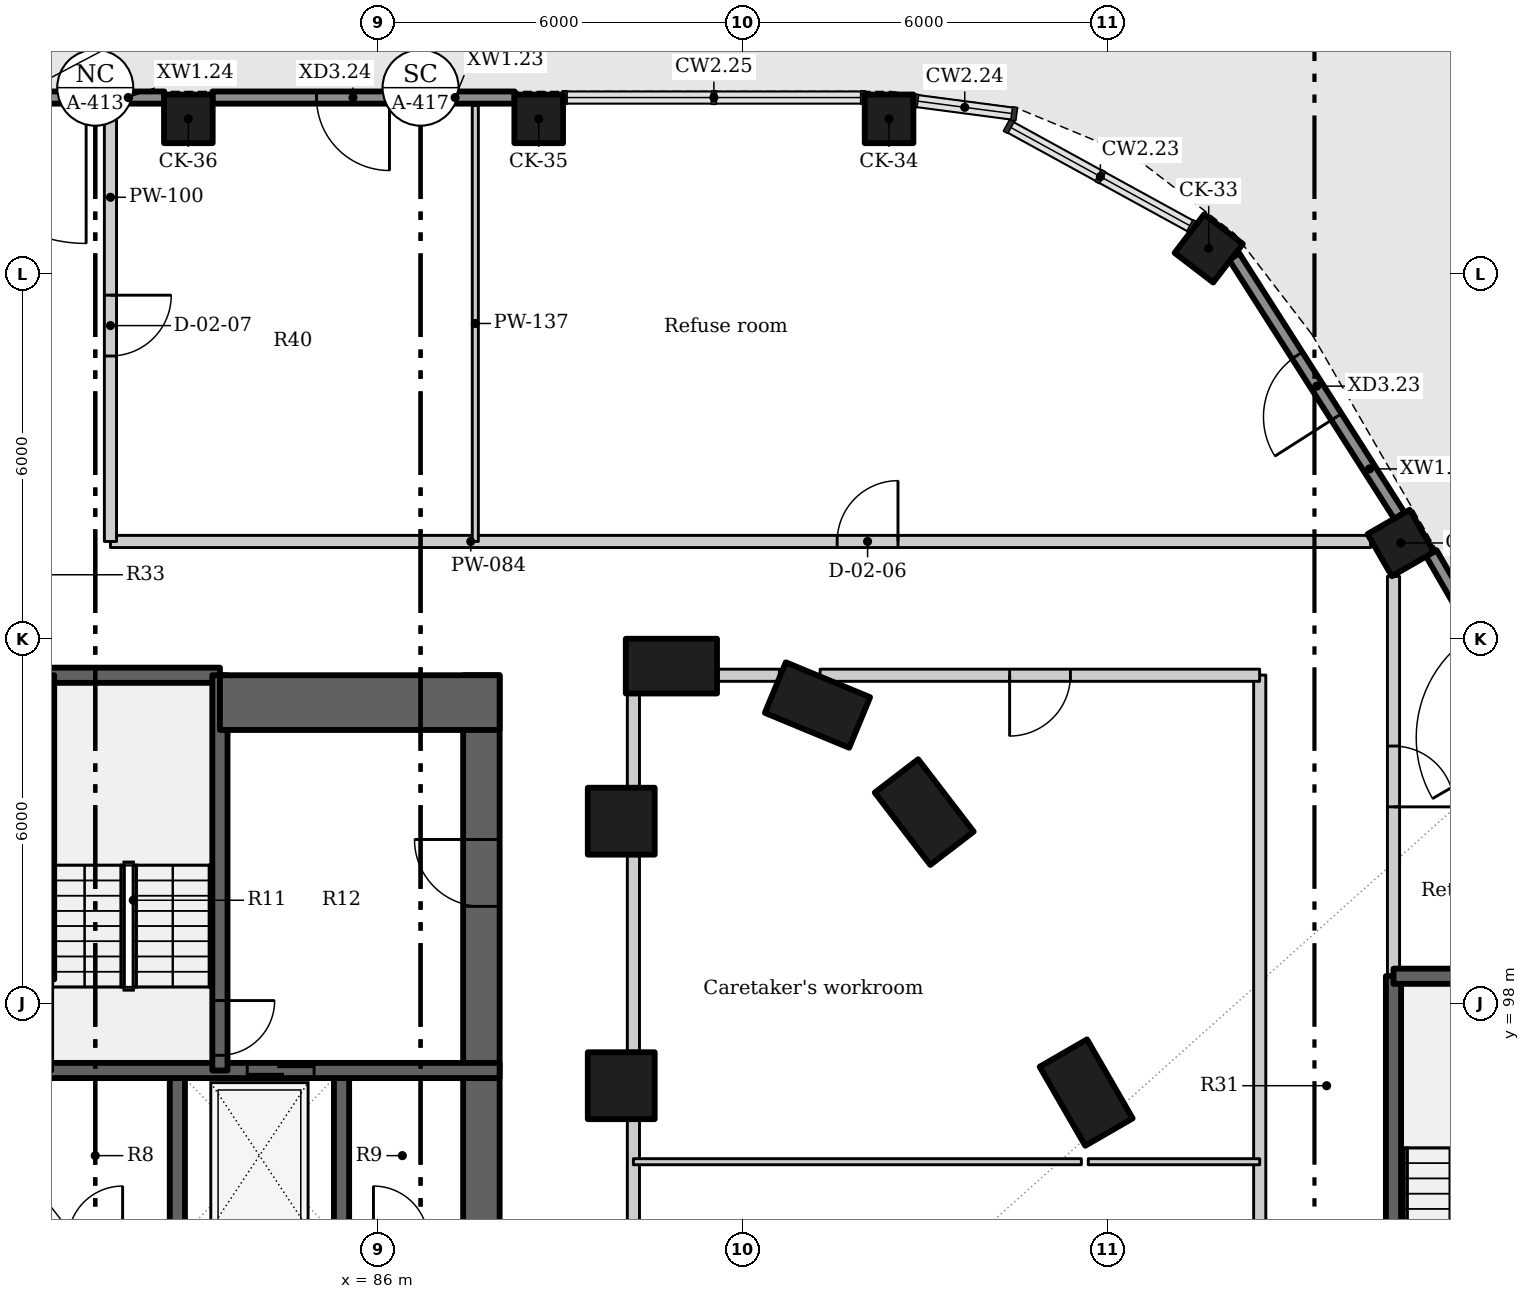
"""IFC4 building model, lengths in metres.
Left out: names, types, materials, properties, quantities, classifications, styles, units other than length and angle.
Written with IfcOpenShell. Run it as: python <this file> out.ifc"""

import sys

from ifc_helpers import new_model, si_unit, direction, frame, frame_2d, origin, origin_2d, place, context, subcontext, project, spatial, rectangle, extrude, element, fill, save


model = new_model("IFC4")
c1 = context("Model", 3, precision=1e-05, world=origin(), true_north=direction((0.0, 1.0)))
c2 = subcontext(c1, "Body", "Model", "MODEL_VIEW")
j1 = project(units=[si_unit("LENGTHUNIT", "METRE"), si_unit("PLANEANGLEUNIT", "RADIAN")], contexts=[c1])
p1 = place(None, origin())
s1 = spatial("IfcSite", under=j1, at=p1, CompositionType="ELEMENT")
p2 = place(p1, origin())
s2 = spatial("IfcBuilding", under=s1, at=p2, CompositionType="ELEMENT")
p3 = place(p2, origin())
s3 = spatial("IfcBuildingStorey", under=s2, at=p3, CompositionType="ELEMENT", Elevation=0.0)
for number, where, z_axis, x_axis in (
    (1, (97.646, 96.537, -1.8), (0.0, 0.0, 1.0), (-0.5, 0.866, 0.0)),
    (2, (94.982, 101.149, -1.8), (0.0, 0.0, 1.0), (-0.609, 0.793, 0.0)),
    (3, (93.227, 102.91, -1.8), (0.0, 0.0, 1.0), (-0.924, 0.383, 0.0)),
    (4, (90.825, 103.55, -1.8), (0.0, 0.0, 1.0), (-1.0, 0.0, 0.0)),
):
    element("IfcColumn", number, at=place(p3, frame(where, z_axis=z_axis, x_axis=x_axis)), inside=s3, PredefinedType="COLUMN", context=c2, shape_type="SweptSolid", body=[
        extrude(rectangle(XDim=1.5, YDim=0.9, at=origin_2d()), origin(), (0.0, 0.0, 1.0), 8.4),
    ])
for number, where, z_axis, x_axis in (
    (5, (90.0, 96.65, -1.8), (0.0, 0.0, 1.0), (0.0, 1.0, 0.0)),
    (6, (90.0, 101.0, -1.8), (0.0, 0.0, 1.0), (0.0, 1.0, 0.0)),
):
    element("IfcColumn", number, at=place(p3, frame(where, z_axis=z_axis, x_axis=x_axis)), inside=s3, PredefinedType="COLUMN", context=c2, shape_type="SweptSolid", body=[
        extrude(rectangle(XDim=1.1, YDim=1.1, at=origin_2d()), origin(), (0.0, 0.0, 1.0), 8.4),
    ])
for number, where, z_axis, x_axis in (
    (7, (102.82, 105.575, -1.8), (0.0, 0.0, 1.0), (-0.5, 0.866, 0.0)),
    (8, (99.661, 110.419, -1.8), (0.0, 0.0, 1.0), (-0.793, 0.609, 0.0)),
    (9, (94.404, 112.55, -1.8), (0.0, 0.0, 1.0), (-1.0, 0.0, 0.0)),
    (10, (88.643, 112.55, -1.8), (0.0, 0.0, 1.0), (-1.0, 0.0, 0.0)),
    (11, (82.881, 112.55, -1.8), (0.0, 0.0, 1.0), (-1.0, 0.0, 0.0)),
):
    element("IfcColumn", number, at=place(p3, frame(where, z_axis=z_axis, x_axis=x_axis)), inside=s3, PredefinedType="COLUMN", context=c2, shape_type="SweptSolid", body=[
        extrude(rectangle(XDim=0.8, YDim=0.8, at=origin_2d()), origin(), (0.0, 0.0, 1.0), 8.4),
    ])
p4 = place(p3, frame((105.826, 101.068, 0.0), z_axis=(0.0, 0.0, 1.0), x_axis=(-0.499990997566, 0.86603060128, 0.0)))
e12 = element("IfcWall", 12, at=p4, inside=s3, PredefinedType="SOLIDWALL", context=c2, shape_type="SweptSolid", body=[
    extrude(rectangle(XDim=5.01, YDim=0.2, at=frame_2d((2.505, 0.0))), origin(), (0.0, 0.0, 1.0), 5.4),
])
p5 = place(p4, frame((1.505, 0.0, 0.0)))
e13 = element("IfcOpeningElement", 13, at=p5, cuts=e12, PredefinedType="OPENING", context=c2, shape_type="SweptSolid", body=[
    extrude(rectangle(XDim=2.0, YDim=2.4, at=frame_2d((1.0, 1.2))), frame((0.0, 0.11, 0.0), z_axis=(0.0, -1.0, 0.0), x_axis=(1.0, 0.0, 0.0)), (0.0, 0.0, 1.0), 0.22),
])
p6 = place(p3, frame((102.798, 106.022, 0.0), z_axis=(0.0, 0.0, 1.0), x_axis=(-0.537671911107, 0.843154147239, 0.0)))
e14 = element("IfcWall", 14, at=p6, inside=s3, PredefinedType="SOLIDWALL", context=c2, shape_type="SweptSolid", body=[
    extrude(rectangle(XDim=5.057, YDim=0.2, at=frame_2d((2.528, 0.0))), origin(), (0.0, 0.0, 1.0), 5.4),
])
p7 = place(p6, frame((1.928, 0.0, 0.0)))
e15 = element("IfcOpeningElement", 15, at=p7, cuts=e14, PredefinedType="OPENING", context=c2, shape_type="SweptSolid", body=[
    extrude(rectangle(XDim=1.2, YDim=2.4, at=frame_2d((0.6, 1.2))), frame((0.0, 0.11, 0.0), z_axis=(0.0, -1.0, 0.0), x_axis=(1.0, 0.0, 0.0)), (0.0, 0.0, 1.0), 0.22),
])
p8 = place(p3, frame((88.247, 112.9, 0.0), z_axis=(0.0, 0.0, 1.0), x_axis=(-1.0, 0.0, 0.0)))
e16 = element("IfcWall", 16, at=p8, inside=s3, PredefinedType="SOLIDWALL", context=c2, shape_type="SweptSolid", body=[
    extrude(rectangle(XDim=4.97, YDim=0.2, at=frame_2d((2.485, 0.0))), origin(), (0.0, 0.0, 1.0), 5.4),
])
p9 = place(p8, frame((2.058, 0.0, 0.0)))
e17 = element("IfcOpeningElement", 17, at=p9, cuts=e16, PredefinedType="OPENING", context=c2, shape_type="SweptSolid", body=[
    extrude(rectangle(XDim=1.2, YDim=2.4, at=frame_2d((0.6, 1.2))), frame((0.0, 0.11, 0.0), z_axis=(0.0, -1.0, 0.0), x_axis=(1.0, 0.0, 0.0)), (0.0, 0.0, 1.0), 0.22),
])
p10 = place(p3, frame((82.485, 112.9, 0.0), z_axis=(0.0, 0.0, 1.0), x_axis=(-1.0, 0.0, 0.0)))
e18 = element("IfcWall", 18, at=p10, inside=s3, PredefinedType="SOLIDWALL", context=c2, shape_type="SweptSolid", body=[
    extrude(rectangle(XDim=4.97, YDim=0.2, at=frame_2d((2.485, 0.0))), origin(), (0.0, 0.0, 1.0), 5.4),
])
p11 = place(p10, frame((1.285, 0.0, 0.0)))
e19 = element("IfcOpeningElement", 19, at=p11, cuts=e18, PredefinedType="OPENING", context=c2, shape_type="SweptSolid", body=[
    extrude(rectangle(XDim=2.4, YDim=2.7, at=frame_2d((1.2, 1.35))), frame((0.0, 0.11, 0.0), z_axis=(0.0, -1.0, 0.0), x_axis=(1.0, 0.0, 0.0)), (0.0, 0.0, 1.0), 0.22),
])
for number, where, z_axis, x_axis in (
    (20, (82.7, 94.1, -1.8), (0.0, 0.0, 1.0), (0.0, 1.0, 0.0)),
    (21, (85.4, 94.1, -1.8), (0.0, 0.0, 1.0), (0.0, 1.0, 0.0)),
):
    element("IfcWall", number, at=place(p3, frame(where, z_axis=z_axis, x_axis=x_axis)), inside=s3, PredefinedType="SHEAR", context=c2, shape_type="SweptSolid", body=[
        extrude(rectangle(XDim=2.8, YDim=0.25, at=frame_2d((1.4, 0.0))), origin(), (0.0, 0.0, 1.0), 8.1),
    ])
p12 = place(p3, frame((87.7, 87.8, -1.8), z_axis=(0.0, 0.0, 1.0), x_axis=(0.0, 1.0, 0.0)))
e22 = element("IfcWall", 22, at=p12, inside=s3, PredefinedType="SHEAR", context=c2, shape_type="SweptSolid", body=[
    extrude(rectangle(XDim=15.6, YDim=0.6, at=frame_2d((7.8, 0.0))), origin(), (0.0, 0.0, 1.0), 8.1),
])
p13 = place(p12, frame((3.85, 0.0, 1.8)))
e23 = element("IfcOpeningElement", 23, at=p13, cuts=e22, PredefinedType="OPENING", context=c2, shape_type="SweptSolid", body=[
    extrude(rectangle(XDim=1.5, YDim=2.1, at=frame_2d((0.75, 1.05))), frame((0.0, 0.31, 0.0), z_axis=(0.0, -1.0, 0.0), x_axis=(1.0, 0.0, 0.0)), (0.0, 0.0, 1.0), 0.62),
])
p14 = place(p12, frame((11.799, 0.0, 1.8)))
e24 = element("IfcOpeningElement", 24, at=p14, cuts=e22, PredefinedType="OPENING", context=c2, shape_type="SweptSolid", body=[
    extrude(rectangle(XDim=1.1, YDim=2.1, at=frame_2d((0.55, 1.05))), frame((0.0, 0.31, 0.0), z_axis=(0.0, -1.0, 0.0), x_axis=(1.0, 0.0, 0.0)), (0.0, 0.0, 1.0), 0.62),
])
p15 = place(p3, frame((80.0, 96.9, -1.8), z_axis=(0.0, 0.0, 1.0), x_axis=(1.0, 0.0, 0.0)))
e25 = element("IfcWall", 25, at=p15, inside=s3, PredefinedType="SHEAR", context=c2, shape_type="SweptSolid", body=[
    extrude(rectangle(XDim=8.0, YDim=0.25, at=frame_2d((4.0, 0.0))), origin(), (0.0, 0.0, 1.0), 8.1),
])
p16 = place(p15, frame((3.849, 0.0, 1.8)))
e26 = element("IfcOpeningElement", 26, at=p16, cuts=e25, PredefinedType="OPENING", context=c2, shape_type="SweptSolid", body=[
    extrude(rectangle(XDim=1.1, YDim=2.1, at=frame_2d((0.55, 1.05))), frame((0.0, 0.135, 0.0), z_axis=(0.0, -1.0, 0.0), x_axis=(1.0, 0.0, 0.0)), (0.0, 0.0, 1.0), 0.27),
])
p17 = place(p3, frame((80.55, 103.4, -1.8), z_axis=(0.0, 0.0, 1.0), x_axis=(1.0, 0.0, 0.0)))
e27 = element("IfcWall", 27, at=p17, inside=s3, PredefinedType="SHEAR", context=c2, shape_type="SweptSolid", body=[
    extrude(rectangle(XDim=2.85, YDim=0.25, at=frame_2d((1.425, 0.0))), origin(), (0.0, 0.0, 1.0), 8.1),
])
p18 = place(p3, frame((83.4, 103.4, -1.8), z_axis=(0.0, 0.0, 1.0), x_axis=(0.0, -1.0, 0.0)))
e28 = element("IfcWall", 28, at=p18, inside=s3, PredefinedType="SHEAR", context=c2, shape_type="SweptSolid", body=[
    extrude(rectangle(XDim=6.5, YDim=0.25, at=frame_2d((3.25, 0.0))), origin(), (0.0, 0.0, 1.0), 8.1),
])
p19 = place(p18, frame((5.35, 0.0, 1.8)))
e29 = element("IfcOpeningElement", 29, at=p19, cuts=e28, PredefinedType="OPENING", context=c2, shape_type="SweptSolid", body=[
    extrude(rectangle(XDim=0.9, YDim=2.1, at=frame_2d((0.45, 1.05))), frame((0.0, 0.135, 0.0), z_axis=(0.0, -1.0, 0.0), x_axis=(1.0, 0.0, 0.0)), (0.0, 0.0, 1.0), 0.27),
])
p20 = place(p3, frame((80.55, 98.397, -1.8), z_axis=(0.0, 0.0, 1.0), x_axis=(0.0, 1.0, 0.0)))
e30 = element("IfcWall", 30, at=p20, inside=s3, PredefinedType="SHEAR", context=c2, shape_type="SweptSolid", body=[
    extrude(rectangle(XDim=5.003, YDim=0.25, at=frame_2d((2.501, 0.0))), origin(), (0.0, 0.0, 1.0), 8.1),
])
p21 = place(p3, frame((83.4, 102.95, -1.8), z_axis=(0.0, 0.0, 1.0), x_axis=(1.0, 0.0, 0.0)))
e31 = element("IfcWall", 31, at=p21, inside=s3, PredefinedType="SHEAR", context=c2, shape_type="SweptSolid", body=[
    extrude(rectangle(XDim=4.6, YDim=0.9, at=frame_2d((2.3, 0.0))), origin(), (0.0, 0.0, 1.0), 8.1),
])
p22 = place(p3, frame((102.7, 91.997, -1.8), z_axis=(0.0, 0.0, 1.0), x_axis=(0.0, 1.0, 0.0)))
e32 = element("IfcWall", 32, at=p22, inside=s3, PredefinedType="SHEAR", context=c2, shape_type="SweptSolid", body=[
    extrude(rectangle(XDim=6.456, YDim=0.25, at=frame_2d((3.228, 0.0))), origin(), (0.0, 0.0, 1.0), 8.1),
])
p23 = place(p22, frame((0.25, 0.0, 1.8)))
e33 = element("IfcOpeningElement", 33, at=p23, cuts=e32, PredefinedType="OPENING", context=c2, shape_type="SweptSolid", body=[
    extrude(rectangle(XDim=0.9, YDim=2.1, at=frame_2d((0.45, 1.05))), frame((0.0, 0.135, 0.0), z_axis=(0.0, -1.0, 0.0), x_axis=(1.0, 0.0, 0.0)), (0.0, 0.0, 1.0), 0.27),
])
p24 = place(p3, frame((102.7, 105.025, 0.0), z_axis=(0.0, 0.0, 1.0), x_axis=(0.0, -1.0, 0.0)))
e34 = element("IfcWall", 34, at=p24, inside=s3, PredefinedType="PARTITIONING", context=c2, shape_type="SweptSolid", body=[
    extrude(rectangle(XDim=6.578, YDim=0.2, at=frame_2d((3.289, 0.0))), origin(), (0.0, 0.0, 1.0), 6.3),
])
p25 = place(p24, frame((2.789, 0.0, 0.0)))
e35 = element("IfcOpeningElement", 35, at=p25, cuts=e34, PredefinedType="OPENING", context=c2, shape_type="SweptSolid", body=[
    extrude(rectangle(XDim=1.0, YDim=2.1, at=frame_2d((0.5, 1.05))), frame((0.0, 0.11, 0.0), z_axis=(0.0, -1.0, 0.0), x_axis=(1.0, 0.0, 0.0)), (0.0, 0.0, 1.0), 0.22),
])
p26 = place(p3, frame((81.6, 105.6, 0.0), z_axis=(0.0, 0.0, 1.0), x_axis=(1.0, 0.0, 0.0)))
e36 = element("IfcWall", 36, at=p26, inside=s3, PredefinedType="PARTITIONING", context=c2, shape_type="SweptSolid", body=[
    extrude(rectangle(XDim=20.723, YDim=0.2, at=frame_2d((10.362, 0.0))), origin(), (0.0, 0.0, 1.0), 6.3),
])
p27 = place(p26, frame((11.951, 0.0, 0.0)))
e37 = element("IfcOpeningElement", 37, at=p27, cuts=e36, PredefinedType="OPENING", context=c2, shape_type="SweptSolid", body=[
    extrude(rectangle(XDim=1.0, YDim=2.1, at=frame_2d((0.5, 1.05))), frame((0.0, 0.11, 0.0), z_axis=(0.0, -1.0, 0.0), x_axis=(1.0, 0.0, 0.0)), (0.0, 0.0, 1.0), 0.22),
])
p28 = place(p3, frame((100.5, 92.53, 0.0), z_axis=(0.0, 0.0, 1.0), x_axis=(0.0, 1.0, 0.0)))
e38 = element("IfcWall", 38, at=p28, inside=s3, PredefinedType="PARTITIONING", context=c2, shape_type="SweptSolid", body=[
    extrude(rectangle(XDim=10.873, YDim=0.2, at=frame_2d((5.437, 0.0))), origin(), (0.0, 0.0, 1.0), 6.3),
])
p29 = place(p3, frame((81.6, 112.77, 0.0), z_axis=(0.0, 0.0, 1.0), x_axis=(0.0, -1.0, 0.0)))
e39 = element("IfcWall", 39, at=p29, inside=s3, PredefinedType="PARTITIONING", context=c2, shape_type="SweptSolid", body=[
    extrude(rectangle(XDim=7.17, YDim=0.2, at=frame_2d((3.585, 0.0))), origin(), (0.0, 0.0, 1.0), 5.53),
])
p30 = place(p29, frame((3.12, 0.0, 0.0)))
e40 = element("IfcOpeningElement", 40, at=p30, cuts=e39, PredefinedType="OPENING", context=c2, shape_type="SweptSolid", body=[
    extrude(rectangle(XDim=1.0, YDim=2.1, at=frame_2d((0.5, 1.05))), frame((0.0, 0.11, 0.0), z_axis=(0.0, -1.0, 0.0), x_axis=(1.0, 0.0, 0.0)), (0.0, 0.0, 1.0), 0.22),
])
for number, where, z_axis, x_axis in (
    (41, (90.2, 92.867, 0.0), (0.0, 0.0, 1.0), (0.0, 1.0, 0.0)),
    (42, (90.2, 97.217, 0.0), (0.0, 0.0, 1.0), (0.0, 1.0, 0.0)),
):
    element("IfcWall", number, at=place(p3, frame(where, z_axis=z_axis, x_axis=x_axis)), inside=s3, PredefinedType="PARTITIONING", context=c2, shape_type="SweptSolid", body=[
        extrude(rectangle(XDim=3.216, YDim=0.2, at=frame_2d((1.608, 0.0))), origin(), (0.0, 0.0, 1.0), 5.53),
    ])
p31 = place(p3, frame((90.2, 101.567, 0.0), z_axis=(0.0, 0.0, 1.0), x_axis=(0.0, 1.0, 0.0)))
e43 = element("IfcWall", 43, at=p31, inside=s3, PredefinedType="PARTITIONING", context=c2, shape_type="SweptSolid", body=[
    extrude(rectangle(XDim=1.516, YDim=0.2, at=frame_2d((0.758, 0.0))), origin(), (0.0, 0.0, 1.0), 6.3),
])
p32 = place(p3, frame((91.592, 103.4, 0.0), z_axis=(0.0, 0.0, 1.0), x_axis=(1.0, 0.0, 0.0)))
e44 = element("IfcWall", 44, at=p32, inside=s3, PredefinedType="PARTITIONING", context=c2, shape_type="SweptSolid", body=[
    extrude(rectangle(XDim=1.008, YDim=0.2, at=frame_2d((0.504, 0.0))), origin(), (0.0, 0.0, 1.0), 5.38),
])
p33 = place(p3, frame((100.498, 103.4, 0.0), z_axis=(0.0, 0.0, 1.0), x_axis=(-1.0, 0.0, 0.0)))
e45 = element("IfcWall", 45, at=p33, inside=s3, PredefinedType="PARTITIONING", context=c2, shape_type="SweptSolid", body=[
    extrude(rectangle(XDim=7.228, YDim=0.2, at=frame_2d((3.614, 0.0))), origin(), (0.0, 0.0, 1.0), 6.3),
])
p34 = place(p33, frame((3.111, 0.0, 0.0)))
e46 = element("IfcOpeningElement", 46, at=p34, cuts=e45, PredefinedType="OPENING", context=c2, shape_type="SweptSolid", body=[
    extrude(rectangle(XDim=1.0, YDim=2.1, at=frame_2d((0.5, 1.05))), frame((0.0, 0.11, 0.0), z_axis=(0.0, -1.0, 0.0), x_axis=(1.0, 0.0, 0.0)), (0.0, 0.0, 1.0), 0.22),
])
p35 = place(p3, frame((102.7, 98.45, -1.8), z_axis=(0.0, 0.0, 1.0), x_axis=(1.0, 0.0, 0.0)))
e47 = element("IfcWall", 47, at=p35, inside=s3, PredefinedType="SHEAR", context=c2, shape_type="SweptSolid", body=[
    extrude(rectangle(XDim=3.45, YDim=0.25, at=frame_2d((1.725, 0.0))), origin(), (0.0, 0.0, 1.0), 8.1),
])
p36 = place(p3, frame((87.6, 105.6, 0.0), z_axis=(0.0, 0.0, 1.0), x_axis=(0.0, 1.0, 0.0)))
e48 = element("IfcWall", 48, at=p36, inside=s3, PredefinedType="PARTITIONING", context=c2, shape_type="SweptSolid", body=[
    extrude(rectangle(XDim=7.17, YDim=0.1, at=frame_2d((3.585, 0.0))), origin(), (0.0, 0.0, 1.0), 5.53),
])
p37 = place(p3, frame((90.2, 95.4, 0.0), z_axis=(0.0, 0.0, 1.0), x_axis=(1.0, 0.0, 0.0)))
e49 = element("IfcWall", 49, at=p37, inside=s3, PredefinedType="PARTITIONING", context=c2, shape_type="SweptSolid", body=[
    extrude(rectangle(XDim=7.366, YDim=0.1, at=frame_2d((3.683, 0.0))), origin(), (0.0, 0.0, 1.0), 6.3),
])
p38 = place(p3, frame((97.68, 95.4, 0.0), z_axis=(0.0, 0.0, 1.0), x_axis=(1.0, 0.0, 0.0)))
e50 = element("IfcWall", 50, at=p38, inside=s3, PredefinedType="PARTITIONING", context=c2, shape_type="SweptSolid", body=[
    extrude(rectangle(XDim=2.82, YDim=0.1, at=frame_2d((1.41, 0.0))), origin(), (0.0, 0.0, 1.0), 5.38),
])
p39 = place(p7, frame((1.2, 0.0, 0.0), z_axis=(0.0, 0.0, 1.0), x_axis=(-1.0, 0.0, 0.0)))
e51 = element("IfcDoor", 51, at=p39, inside=s3, OperationType="SINGLE_SWING_LEFT", PredefinedType="DOOR", context=c2, shape_type="SweptSolid", body=[
    extrude(rectangle(XDim=1.2, YDim=2.4, at=frame_2d((0.6, 1.2))), frame((0.0, 0.025, 0.0), z_axis=(0.0, -1.0, 0.0), x_axis=(1.0, 0.0, 0.0)), (0.0, 0.0, 1.0), 0.05),
])
fill(e15, e51)
p40 = place(p9, frame((1.2, 0.0, 0.0), z_axis=(0.0, 0.0, 1.0), x_axis=(-1.0, 0.0, 0.0)))
e52 = element("IfcDoor", 52, at=p40, inside=s3, OperationType="SINGLE_SWING_LEFT", PredefinedType="DOOR", context=c2, shape_type="SweptSolid", body=[
    extrude(rectangle(XDim=1.2, YDim=2.4, at=frame_2d((0.6, 1.2))), frame((0.0, 0.025, 0.0), z_axis=(0.0, -1.0, 0.0), x_axis=(1.0, 0.0, 0.0)), (0.0, 0.0, 1.0), 0.05),
])
fill(e17, e52)
p41 = place(p11, frame((2.4, 0.0, 0.0), z_axis=(0.0, 0.0, 1.0), x_axis=(-1.0, 0.0, 0.0)))
e53 = element("IfcDoor", 53, at=p41, inside=s3, OperationType="DOUBLE_DOOR_DOUBLE_SWING", PredefinedType="DOOR", context=c2, shape_type="SweptSolid", body=[
    extrude(rectangle(XDim=2.4, YDim=2.7, at=frame_2d((1.2, 1.35))), frame((0.0, 0.025, 0.0), z_axis=(0.0, -1.0, 0.0), x_axis=(1.0, 0.0, 0.0)), (0.0, 0.0, 1.0), 0.05),
])
fill(e19, e53)
p42 = place(p16, origin())
e54 = element("IfcDoor", 54, at=p42, inside=s3, OperationType="SLIDING_TO_LEFT", PredefinedType="DOOR", context=c2, shape_type="SweptSolid", body=[
    extrude(rectangle(XDim=1.1, YDim=2.1, at=frame_2d((0.55, 1.05))), frame((0.0, 0.025, 0.0), z_axis=(0.0, -1.0, 0.0), x_axis=(1.0, 0.0, 0.0)), (0.0, 0.0, 1.0), 0.05),
])
fill(e26, e54)
p43 = place(p19, origin())
e55 = element("IfcDoor", 55, at=p43, inside=s3, OperationType="SINGLE_SWING_LEFT", PredefinedType="DOOR", context=c2, shape_type="SweptSolid", body=[
    extrude(rectangle(XDim=0.9, YDim=2.1, at=frame_2d((0.45, 1.05))), frame((0.0, 0.025, 0.0), z_axis=(0.0, -1.0, 0.0), x_axis=(1.0, 0.0, 0.0)), (0.0, 0.0, 1.0), 0.05),
])
fill(e29, e55)
p44 = place(p25, origin())
e56 = element("IfcDoor", 56, at=p44, inside=s3, OperationType="SINGLE_SWING_RIGHT", PredefinedType="DOOR", context=c2, shape_type="SweptSolid", body=[
    extrude(rectangle(XDim=1.0, YDim=2.1, at=frame_2d((0.5, 1.05))), frame((0.0, 0.025, 0.0), z_axis=(0.0, -1.0, 0.0), x_axis=(1.0, 0.0, 0.0)), (0.0, 0.0, 1.0), 0.05),
])
fill(e35, e56)
p45 = place(p27, origin())
e57 = element("IfcDoor", 57, at=p45, inside=s3, OperationType="SINGLE_SWING_RIGHT", PredefinedType="DOOR", context=c2, shape_type="SweptSolid", body=[
    extrude(rectangle(XDim=1.0, YDim=2.1, at=frame_2d((0.5, 1.05))), frame((0.0, 0.025, 0.0), z_axis=(0.0, -1.0, 0.0), x_axis=(1.0, 0.0, 0.0)), (0.0, 0.0, 1.0), 0.05),
])
fill(e37, e57)
p46 = place(p30, origin())
e58 = element("IfcDoor", 58, at=p46, inside=s3, OperationType="SINGLE_SWING_LEFT", PredefinedType="DOOR", context=c2, shape_type="SweptSolid", body=[
    extrude(rectangle(XDim=1.0, YDim=2.1, at=frame_2d((0.5, 1.05))), frame((0.0, 0.025, 0.0), z_axis=(0.0, -1.0, 0.0), x_axis=(1.0, 0.0, 0.0)), (0.0, 0.0, 1.0), 0.05),
])
fill(e40, e58)
p47 = place(p34, origin())
e59 = element("IfcDoor", 59, at=p47, inside=s3, OperationType="SINGLE_SWING_RIGHT", PredefinedType="DOOR", context=c2, shape_type="SweptSolid", body=[
    extrude(rectangle(XDim=1.0, YDim=2.1, at=frame_2d((0.5, 1.05))), frame((0.0, 0.025, 0.0), z_axis=(0.0, -1.0, 0.0), x_axis=(1.0, 0.0, 0.0)), (0.0, 0.0, 1.0), 0.05),
])
fill(e46, e59)
p48 = place(p14, origin())
e60 = element("IfcDoor", 60, at=p48, inside=s3, OperationType="SINGLE_SWING_RIGHT", PredefinedType="DOOR", context=c2, shape_type="SweptSolid", body=[
    extrude(rectangle(XDim=1.1, YDim=2.1, at=frame_2d((0.55, 1.05))), frame((0.0, 0.025, 0.0), z_axis=(0.0, -1.0, 0.0), x_axis=(1.0, 0.0, 0.0)), (0.0, 0.0, 1.0), 0.05),
])
fill(e24, e60)
save(model, sys.argv[1])
